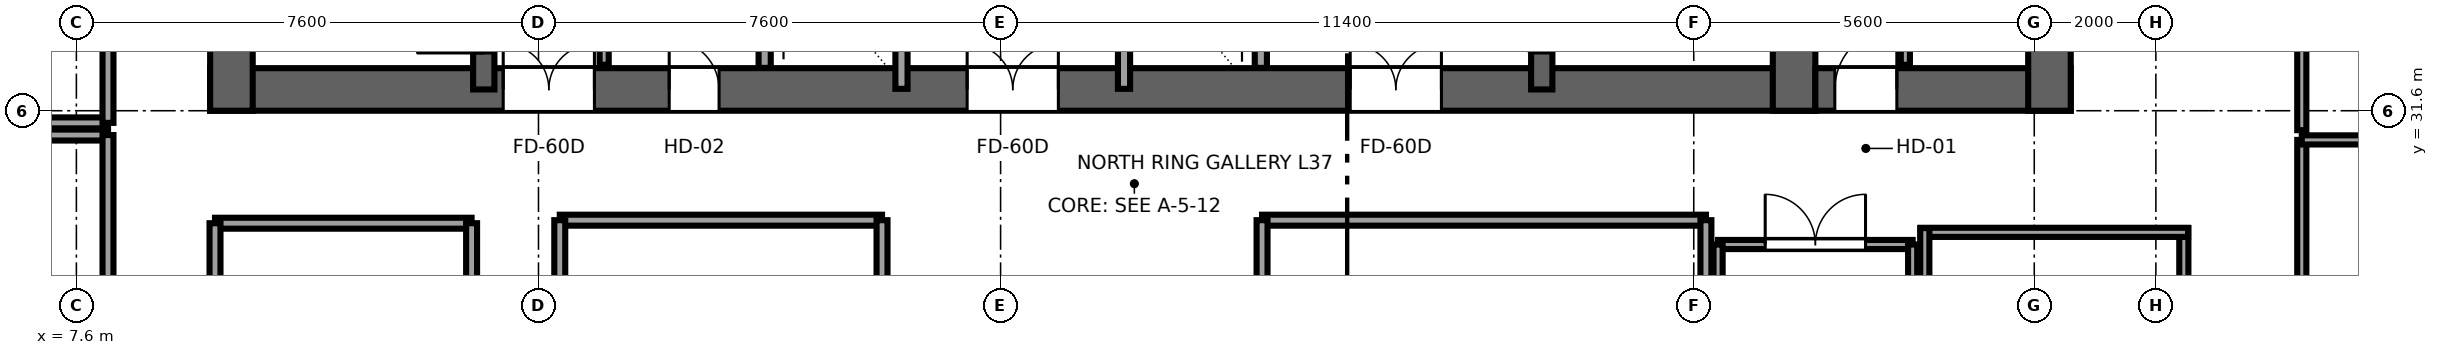
"""IFC4 building model, lengths in metres.
Left out: names, types, materials, properties, quantities, classifications, styles, units other than length and angle.
Written with IfcOpenShell. Run it as: python <this file> out.ifc"""

import sys

from ifc_helpers import new_model, si_unit, direction, frame, frame_2d, origin, place, context, subcontext, project, spatial, rectangle, extrude, source, transform, mapped, element, fill, save


model = new_model("IFC4")
c1 = context("Model", 3, precision=1e-05, world=origin(), true_north=direction((0.0, 1.0)))
c2 = subcontext(c1, "Body", "Model", "MODEL_VIEW")
j1 = project(units=[si_unit("LENGTHUNIT", "METRE"), si_unit("PLANEANGLEUNIT", "RADIAN")], contexts=[c1])
p1 = place(None, origin())
s1 = spatial("IfcSite", under=j1, at=p1, CompositionType="ELEMENT")
p2 = place(p1, origin())
s2 = spatial("IfcBuilding", under=s1, at=p2, CompositionType="ELEMENT")
p3 = place(p2, frame((0.0, 0.0, 143.5)))
s3 = spatial("IfcBuildingStorey", under=s2, at=p3, CompositionType="ELEMENT", Elevation=143.5)
p4 = place(p3, frame((9.8, 31.95, 0.0), z_axis=(0.0, 0.0, 1.0), x_axis=(1.0, 0.0, 0.0)))
e1 = element("IfcWall", 1, at=p4, inside=s3, PredefinedType="SHEAR", context=c2, shape_type="SweptSolid", body=[
    extrude(rectangle(XDim=26.4, YDim=0.7, at=frame_2d((13.2, 0.0))), origin(), (0.0, 0.0, 1.0), 3.55),
])
p5 = place(p4, frame((6.32, 0.0, 0.0), z_axis=(0.0, 0.0, 1.0), x_axis=(-1.0, 0.0, 0.0)))
e2 = element("IfcOpeningElement", 2, at=p5, cuts=e1, PredefinedType="OPENING", context=c2, shape_type="SweptSolid", body=[
    extrude(rectangle(XDim=1.5, YDim=2.04, at=frame_2d((0.75, 1.02))), frame((0.0, 0.36, 0.0), z_axis=(0.0, -1.0, 0.0), x_axis=(1.0, 0.0, 0.0)), (0.0, 0.0, 1.0), 0.72),
])
p6 = place(p4, frame((13.95, 0.0, 0.0), z_axis=(0.0, 0.0, 1.0), x_axis=(-1.0, 0.0, 0.0)))
e3 = element("IfcOpeningElement", 3, at=p6, cuts=e1, PredefinedType="OPENING", context=c2, shape_type="SweptSolid", body=[
    extrude(rectangle(XDim=1.5, YDim=2.04, at=frame_2d((0.75, 1.02))), frame((0.0, 0.36, 0.0), z_axis=(0.0, -1.0, 0.0), x_axis=(1.0, 0.0, 0.0)), (0.0, 0.0, 1.0), 0.72),
])
p7 = place(p4, frame((20.25, 0.0, 0.0), z_axis=(0.0, 0.0, 1.0), x_axis=(-1.0, 0.0, 0.0)))
e4 = element("IfcOpeningElement", 4, at=p7, cuts=e1, PredefinedType="OPENING", context=c2, shape_type="SweptSolid", body=[
    extrude(rectangle(XDim=1.5, YDim=2.04, at=frame_2d((0.75, 1.02))), frame((0.0, 0.36, 0.0), z_axis=(0.0, -1.0, 0.0), x_axis=(1.0, 0.0, 0.0)), (0.0, 0.0, 1.0), 0.72),
])
p8 = place(p4, frame((8.37, 0.0, 0.0), z_axis=(0.0, 0.0, 1.0), x_axis=(-1.0, 0.0, 0.0)))
e5 = element("IfcOpeningElement", 5, at=p8, cuts=e1, PredefinedType="OPENING", context=c2, shape_type="SweptSolid", body=[
    extrude(rectangle(XDim=0.82, YDim=2.01, at=frame_2d((0.41, 1.005))), frame((0.0, 0.36, 0.0), z_axis=(0.0, -1.0, 0.0), x_axis=(1.0, 0.0, 0.0)), (0.0, 0.0, 1.0), 0.72),
])
for number, where, z_axis, x_axis in (
    (6, (10.15, 31.6, 0.0), (0.0, 0.0, 1.0), (0.0, 1.0, 0.0)),
    (7, (35.85, 31.6, 0.0), (0.0, 0.0, 1.0), (0.0, 1.0, 0.0)),
):
    element("IfcWall", number, at=place(p3, frame(where, z_axis=z_axis, x_axis=x_axis)), inside=s3, PredefinedType="SHEAR", context=c2, shape_type="SweptSolid", body=[
        extrude(rectangle(XDim=13.6, YDim=0.7, at=frame_2d((6.8, 0.0))), origin(), (0.0, 0.0, 1.0), 3.55),
    ])
p9 = place(p3, frame((14.3, 31.95, 0.0), z_axis=(0.0, 0.0, 1.0), x_axis=(0.0, 1.0, 0.0)))
e8 = element("IfcWall", 8, at=p9, inside=s3, PredefinedType="SHEAR", context=c2, shape_type="SweptSolid", body=[
    extrude(rectangle(XDim=12.9, YDim=0.35, at=frame_2d((6.45, 0.0))), origin(), (0.0, 0.0, 1.0), 3.55),
])
p10 = place(p9, frame((0.6, 0.0, 0.0)))
e9 = element("IfcOpeningElement", 9, at=p10, cuts=e8, PredefinedType="OPENING", context=c2, shape_type="SweptSolid", body=[
    extrude(rectangle(XDim=1.1, YDim=2.12, at=frame_2d((0.55, 1.06))), frame((0.0, 0.185, 0.0), z_axis=(0.0, -1.0, 0.0), x_axis=(1.0, 0.0, 0.0)), (0.0, 0.0, 1.0), 0.37),
])
p11 = place(p3, frame((31.7, 31.95, 0.0), z_axis=(0.0, 0.0, 1.0), x_axis=(0.0, 1.0, 0.0)))
e10 = element("IfcWall", 10, at=p11, inside=s3, PredefinedType="SHEAR", context=c2, shape_type="SweptSolid", body=[
    extrude(rectangle(XDim=12.9, YDim=0.35, at=frame_2d((6.45, 0.0))), origin(), (0.0, 0.0, 1.0), 3.55),
])
p12 = place(p11, frame((1.7, 0.0, 0.0), z_axis=(0.0, 0.0, 1.0), x_axis=(-1.0, 0.0, 0.0)))
e11 = element("IfcOpeningElement", 11, at=p12, cuts=e10, PredefinedType="OPENING", context=c2, shape_type="SweptSolid", body=[
    extrude(rectangle(XDim=1.1, YDim=2.12, at=frame_2d((0.55, 1.06))), frame((0.0, 0.185, 0.0), z_axis=(0.0, -1.0, 0.0), x_axis=(1.0, 0.0, 0.0)), (0.0, 0.0, 1.0), 0.37),
])
p13 = place(p3, frame((36.2, 31.95, 0.0), z_axis=(0.0, 0.0, 1.0), x_axis=(1.0, 0.0, 0.0)))
e12 = element("IfcWall", 12, at=p13, inside=s3, PredefinedType="SHEAR", context=c2, shape_type="SweptSolid", body=[
    extrude(rectangle(XDim=4.2, YDim=0.7, at=frame_2d((2.1, 0.0))), origin(), (0.0, 0.0, 1.0), 3.55),
])
p14 = place(p13, frame((1.34, 0.0, 0.0), z_axis=(0.0, 0.0, 1.0), x_axis=(-1.0, 0.0, 0.0)))
e13 = element("IfcOpeningElement", 13, at=p14, cuts=e12, PredefinedType="OPENING", context=c2, shape_type="SweptSolid", body=[
    extrude(rectangle(XDim=1.02, YDim=2.03, at=frame_2d((0.51, 1.015))), frame((0.0, 0.36, 0.0), z_axis=(0.0, -1.0, 0.0), x_axis=(1.0, 0.0, 0.0)), (0.0, 0.0, 1.0), 0.72),
])
p15 = place(p3, frame((40.05, 31.6, 0.0), z_axis=(0.0, 0.0, 1.0), x_axis=(0.0, 1.0, 0.0)))
e14 = element("IfcWall", 14, at=p15, inside=s3, PredefinedType="SHEAR", context=c2, shape_type="SweptSolid", body=[
    extrude(rectangle(XDim=13.6, YDim=0.7, at=frame_2d((6.8, 0.0))), origin(), (0.0, 0.0, 1.0), 3.55),
])
for number, where, z_axis, x_axis in (
    (15, (18.92, 32.304, 0.0), (0.0, 0.0, 1.0), (0.0, 1.0, 0.0)),
    (16, (27.08, 32.304, 0.0), (0.0, 0.0, 1.0), (0.0, 1.0, 0.0)),
):
    element("IfcWall", number, at=place(p3, frame(where, z_axis=z_axis, x_axis=x_axis)), inside=s3, PredefinedType="SOLIDWALL", context=c2, shape_type="SweptSolid", body=[
        extrude(rectangle(XDim=3.846, YDim=0.2, at=frame_2d((1.923, 0.0))), origin(), (0.0, 0.0, 1.0), 3.29),
    ])
p16 = place(p3, frame((21.17, 31.96, 0.0), z_axis=(0.0, 0.0, 1.0), x_axis=(0.0, 1.0, 0.0)))
e17 = element("IfcWall", 17, at=p16, inside=s3, PredefinedType="SOLIDWALL", context=c2, shape_type="SweptSolid", body=[
    extrude(rectangle(XDim=12.58, YDim=0.2, at=frame_2d((6.29, 0.0))), origin(), (0.0, 0.0, 1.0), 3.29),
])
p17 = place(p16, frame((5.74, 0.0, 0.0)))
e18 = element("IfcOpeningElement", 18, at=p17, cuts=e17, PredefinedType="OPENING", context=c2, shape_type="SweptSolid", body=[
    extrude(rectangle(XDim=1.1, YDim=2.12, at=frame_2d((0.55, 1.06))), frame((0.0, 0.11, 0.0), z_axis=(0.0, -1.0, 0.0), x_axis=(1.0, 0.0, 0.0)), (0.0, 0.0, 1.0), 0.22),
])
p18 = place(p16, frame((8.24, 0.0, 0.0)))
e19 = element("IfcOpeningElement", 19, at=p18, cuts=e17, PredefinedType="OPENING", context=c2, shape_type="SweptSolid", body=[
    extrude(rectangle(XDim=1.1, YDim=2.12, at=frame_2d((0.55, 1.06))), frame((0.0, 0.11, 0.0), z_axis=(0.0, -1.0, 0.0), x_axis=(1.0, 0.0, 0.0)), (0.0, 0.0, 1.0), 0.22),
])
p19 = place(p3, frame((24.83, 31.96, 0.0), z_axis=(0.0, 0.0, 1.0), x_axis=(0.0, 1.0, 0.0)))
e20 = element("IfcWall", 20, at=p19, inside=s3, PredefinedType="SOLIDWALL", context=c2, shape_type="SweptSolid", body=[
    extrude(rectangle(XDim=12.58, YDim=0.2, at=frame_2d((6.29, 0.0))), origin(), (0.0, 0.0, 1.0), 3.29),
])
p20 = place(p19, frame((5.74, 0.0, 0.0)))
e21 = element("IfcOpeningElement", 21, at=p20, cuts=e20, PredefinedType="OPENING", context=c2, shape_type="SweptSolid", body=[
    extrude(rectangle(XDim=1.1, YDim=2.12, at=frame_2d((0.55, 1.06))), frame((0.0, 0.11, 0.0), z_axis=(0.0, -1.0, 0.0), x_axis=(1.0, 0.0, 0.0)), (0.0, 0.0, 1.0), 0.22),
])
p21 = place(p19, frame((8.24, 0.0, 0.0)))
e22 = element("IfcOpeningElement", 22, at=p21, cuts=e20, PredefinedType="OPENING", context=c2, shape_type="SweptSolid", body=[
    extrude(rectangle(XDim=1.1, YDim=2.12, at=frame_2d((0.55, 1.06))), frame((0.0, 0.11, 0.0), z_axis=(0.0, -1.0, 0.0), x_axis=(1.0, 0.0, 0.0)), (0.0, 0.0, 1.0), 0.22),
])
p22 = place(p3, frame((16.28, 32.355, 0.0), z_axis=(0.0, 0.0, 1.0), x_axis=(0.0, 1.0, 0.0)))
e23 = element("IfcWall", 23, at=p22, inside=s3, PredefinedType="PARTITIONING", context=c2, shape_type="SweptSolid", body=[
    extrude(rectangle(XDim=0.865, YDim=0.15, at=frame_2d((0.433, 0.0))), origin(), (0.0, 0.0, 1.0), 3.29),
])
p23 = place(p3, frame((37.68, 32.355, 0.0), z_axis=(0.0, 0.0, 1.0), x_axis=(0.0, 1.0, 0.0)))
e24 = element("IfcWall", 24, at=p23, inside=s3, PredefinedType="PARTITIONING", context=c2, shape_type="SweptSolid", body=[
    extrude(rectangle(XDim=3.845, YDim=0.15, at=frame_2d((1.922, 0.0))), origin(), (0.0, 0.0, 1.0), 3.29),
])
p24 = place(p23, frame((1.413, 0.0, 0.0)))
e25 = element("IfcOpeningElement", 25, at=p24, cuts=e24, PredefinedType="OPENING", context=c2, shape_type="SweptSolid", body=[
    extrude(rectangle(XDim=1.02, YDim=2.03, at=frame_2d((0.51, 1.015))), frame((0.0, 0.085, 0.0), z_axis=(0.0, -1.0, 0.0), x_axis=(1.0, 0.0, 0.0)), (0.0, 0.0, 1.0), 0.17),
])
p25 = place(p3, frame((0.405, 31.2, 0.0), z_axis=(0.0, 0.0, 1.0), x_axis=(1.0, 0.0, 0.0)))
e26 = element("IfcWall", 26, at=p25, inside=s3, PredefinedType="PARTITIONING", context=c2, shape_type="SweptSolid", body=[
    extrude(rectangle(XDim=7.715, YDim=0.18, at=frame_2d((3.857, 0.0))), origin(), (0.0, 0.0, 1.0), 3.29),
])
p26 = place(p3, frame((8.12, 23.7, 0.0), z_axis=(0.0, 0.0, 1.0), x_axis=(0.0, 1.0, 0.0)))
e27 = element("IfcWall", 27, at=p26, inside=s3, PredefinedType="PARTITIONING", context=c2, shape_type="SweptSolid", body=[
    extrude(rectangle(XDim=7.5, YDim=0.18, at=frame_2d((3.75, 0.0))), origin(), (0.0, 0.0, 1.0), 3.29),
])
p27 = place(p26, frame((2.925, 0.0, 0.0)))
e28 = element("IfcOpeningElement", 28, at=p27, cuts=e27, PredefinedType="OPENING", context=c2, shape_type="SweptSolid", body=[
    extrude(rectangle(XDim=1.65, YDim=2.15, at=frame_2d((0.825, 1.075))), frame((0.0, 0.1, 0.0), z_axis=(0.0, -1.0, 0.0), x_axis=(1.0, 0.0, 0.0)), (0.0, 0.0, 1.0), 0.2),
])
p28 = place(p3, frame((0.405, 31.4, 0.0), z_axis=(0.0, 0.0, 1.0), x_axis=(1.0, 0.0, 0.0)))
e29 = element("IfcWall", 29, at=p28, inside=s3, PredefinedType="PARTITIONING", context=c2, shape_type="SweptSolid", body=[
    extrude(rectangle(XDim=7.715, YDim=0.18, at=frame_2d((3.857, 0.0))), origin(), (0.0, 0.0, 1.0), 3.29),
])
p29 = place(p3, frame((8.12, 31.4, 0.0), z_axis=(0.0, 0.0, 1.0), x_axis=(0.0, 1.0, 0.0)))
e30 = element("IfcWall", 30, at=p29, inside=s3, PredefinedType="PARTITIONING", context=c2, shape_type="SweptSolid", body=[
    extrude(rectangle(XDim=6.8, YDim=0.18, at=frame_2d((3.4, 0.0))), origin(), (0.0, 0.0, 1.0), 3.29),
])
p30 = place(p29, frame((3.175, 0.0, 0.0)))
e31 = element("IfcOpeningElement", 31, at=p30, cuts=e30, PredefinedType="OPENING", context=c2, shape_type="SweptSolid", body=[
    extrude(rectangle(XDim=1.65, YDim=2.15, at=frame_2d((0.825, 1.075))), frame((0.0, 0.1, 0.0), z_axis=(0.0, -1.0, 0.0), x_axis=(1.0, 0.0, 0.0)), (0.0, 0.0, 1.0), 0.2),
])
p31 = place(p3, frame((44.2, 23.78, 0.0), z_axis=(0.0, 0.0, 1.0), x_axis=(0.0, 1.0, 0.0)))
e32 = element("IfcWall", 32, at=p31, inside=s3, PredefinedType="PARTITIONING", context=c2, shape_type="SweptSolid", body=[
    extrude(rectangle(XDim=7.34, YDim=0.15, at=frame_2d((3.67, 0.0))), origin(), (0.0, 0.0, 1.0), 3.29),
])
p32 = place(p31, frame((3.18, 0.0, 0.0)))
e33 = element("IfcOpeningElement", 33, at=p32, cuts=e32, PredefinedType="OPENING", context=c2, shape_type="SweptSolid", body=[
    extrude(rectangle(XDim=0.98, YDim=2.12, at=frame_2d((0.49, 1.06))), frame((0.0, 0.085, 0.0), z_axis=(0.0, -1.0, 0.0), x_axis=(1.0, 0.0, 0.0)), (0.0, 0.0, 1.0), 0.17),
])
p33 = place(p3, frame((44.2, 31.12, 0.0), z_axis=(0.0, 0.0, 1.0), x_axis=(1.0, 0.0, 0.0)))
e34 = element("IfcWall", 34, at=p33, inside=s3, PredefinedType="PARTITIONING", context=c2, shape_type="SweptSolid", body=[
    extrude(rectangle(XDim=10.03, YDim=0.15, at=frame_2d((5.015, 0.0))), origin(), (0.0, 0.0, 1.0), 3.29),
])
p34 = place(p3, frame((44.2, 31.28, 0.0), z_axis=(0.0, 0.0, 1.0), x_axis=(0.0, 1.0, 0.0)))
e35 = element("IfcWall", 35, at=p34, inside=s3, PredefinedType="PARTITIONING", context=c2, shape_type="SweptSolid", body=[
    extrude(rectangle(XDim=6.24, YDim=0.15, at=frame_2d((3.12, 0.0))), origin(), (0.0, 0.0, 1.0), 3.29),
])
p35 = place(p34, frame((3.23, 0.0, 0.0)))
e36 = element("IfcOpeningElement", 36, at=p35, cuts=e35, PredefinedType="OPENING", context=c2, shape_type="SweptSolid", body=[
    extrude(rectangle(XDim=0.98, YDim=2.12, at=frame_2d((0.49, 1.06))), frame((0.0, 0.085, 0.0), z_axis=(0.0, -1.0, 0.0), x_axis=(1.0, 0.0, 0.0)), (0.0, 0.0, 1.0), 0.17),
])
p36 = place(p3, frame((42.26, 25.93, 0.0), z_axis=(0.0, 0.0, 1.0), x_axis=(0.0, 1.0, 0.0)))
e37 = element("IfcWall", 37, at=p36, inside=s3, PredefinedType="PARTITIONING", context=c2, shape_type="SweptSolid", body=[
    extrude(rectangle(XDim=3.74, YDim=0.15, at=frame_2d((1.87, 0.0))), origin(), (0.0, 0.0, 1.0), 3.29),
])
p37 = place(p36, frame((1.19, 0.0, 0.0)))
e38 = element("IfcOpeningElement", 38, at=p37, cuts=e37, PredefinedType="OPENING", context=c2, shape_type="SweptSolid", body=[
    extrude(rectangle(XDim=0.92, YDim=2.01, at=frame_2d((0.46, 1.005))), frame((0.0, 0.085, 0.0), z_axis=(0.0, -1.0, 0.0), x_axis=(1.0, 0.0, 0.0)), (0.0, 0.0, 1.0), 0.17),
])
p38 = place(p3, frame((37.93, 29.6, 0.0), z_axis=(0.0, 0.0, 1.0), x_axis=(1.0, 0.0, 0.0)))
e39 = element("IfcWall", 39, at=p38, inside=s3, PredefinedType="PARTITIONING", context=c2, shape_type="SweptSolid", body=[
    extrude(rectangle(XDim=4.4, YDim=0.15, at=frame_2d((2.2, 0.0))), origin(), (0.0, 0.0, 1.0), 3.29),
])
p39 = place(p3, frame((38.0, 25.93, 0.0), z_axis=(0.0, 0.0, 1.0), x_axis=(0.0, 1.0, 0.0)))
e40 = element("IfcWall", 40, at=p39, inside=s3, PredefinedType="PARTITIONING", context=c2, shape_type="SweptSolid", body=[
    extrude(rectangle(XDim=3.74, YDim=0.15, at=frame_2d((1.87, 0.0))), origin(), (0.0, 0.0, 1.0), 3.29),
])
p40 = place(p3, frame((9.88, 29.75, 0.0), z_axis=(0.0, 0.0, 1.0), x_axis=(1.0, 0.0, 0.0)))
e41 = element("IfcWall", 41, at=p40, inside=s3, PredefinedType="PARTITIONING", context=c2, shape_type="SweptSolid", body=[
    extrude(rectangle(XDim=4.22, YDim=0.18, at=frame_2d((2.11, 0.0))), origin(), (0.0, 0.0, 1.0), 3.29),
])
for number, where, z_axis, x_axis in (
    (42, (9.88, 23.7, 0.0), (0.0, 0.0, 1.0), (0.0, 1.0, 0.0)),
    (43, (14.1, 23.7, 0.0), (0.0, 0.0, 1.0), (0.0, 1.0, 0.0)),
):
    element("IfcWall", number, at=place(p3, frame(where, z_axis=z_axis, x_axis=x_axis)), inside=s3, PredefinedType="PARTITIONING", context=c2, shape_type="SweptSolid", body=[
        extrude(rectangle(XDim=6.05, YDim=0.18, at=frame_2d((3.025, 0.0))), origin(), (0.0, 0.0, 1.0), 3.29),
    ])
p41 = place(p3, frame((27.1, 29.8, 0.0), z_axis=(0.0, 0.0, 1.0), x_axis=(1.0, 0.0, 0.0)))
e44 = element("IfcWall", 44, at=p41, inside=s3, PredefinedType="PARTITIONING", context=c2, shape_type="SweptSolid", body=[
    extrude(rectangle(XDim=7.3, YDim=0.18, at=frame_2d((3.65, 0.0))), origin(), (0.0, 0.0, 1.0), 3.29),
])
for number, where, z_axis, x_axis in (
    (45, (27.1, 23.7, 0.0), (0.0, 0.0, 1.0), (0.0, 1.0, 0.0)),
    (46, (34.4, 23.7, 0.0), (0.0, 0.0, 1.0), (0.0, 1.0, 0.0)),
):
    element("IfcWall", number, at=place(p3, frame(where, z_axis=z_axis, x_axis=x_axis)), inside=s3, PredefinedType="PARTITIONING", context=c2, shape_type="SweptSolid", body=[
        extrude(rectangle(XDim=6.1, YDim=0.18, at=frame_2d((3.05, 0.0))), origin(), (0.0, 0.0, 1.0), 3.29),
    ])
p42 = place(p3, frame((15.55, 29.8, 0.0), z_axis=(0.0, 0.0, 1.0), x_axis=(1.0, 0.0, 0.0)))
e47 = element("IfcWall", 47, at=p42, inside=s3, PredefinedType="PARTITIONING", context=c2, shape_type="SweptSolid", body=[
    extrude(rectangle(XDim=5.3, YDim=0.18, at=frame_2d((2.65, 0.0))), origin(), (0.0, 0.0, 1.0), 3.29),
])
for number, where, z_axis, x_axis in (
    (48, (15.55, 23.7, 0.0), (0.0, 0.0, 1.0), (0.0, 1.0, 0.0)),
    (49, (20.85, 23.7, 0.0), (0.0, 0.0, 1.0), (0.0, 1.0, 0.0)),
):
    element("IfcWall", number, at=place(p3, frame(where, z_axis=z_axis, x_axis=x_axis)), inside=s3, PredefinedType="PARTITIONING", context=c2, shape_type="SweptSolid", body=[
        extrude(rectangle(XDim=6.1, YDim=0.18, at=frame_2d((3.05, 0.0))), origin(), (0.0, 0.0, 1.0), 3.29),
    ])
p43 = place(p3, frame((34.6, 29.4, 0.0), z_axis=(0.0, 0.0, 1.0), x_axis=(1.0, 0.0, 0.0)))
e50 = element("IfcWall", 50, at=p43, inside=s3, PredefinedType="PARTITIONING", context=c2, shape_type="SweptSolid", body=[
    extrude(rectangle(XDim=3.2, YDim=0.15, at=frame_2d((1.6, 0.0))), origin(), (0.0, 0.0, 1.0), 3.29),
])
p44 = place(p43, frame((0.775, 0.0, 0.0)))
e51 = element("IfcOpeningElement", 51, at=p44, cuts=e50, PredefinedType="OPENING", context=c2, shape_type="SweptSolid", body=[
    extrude(rectangle(XDim=1.65, YDim=2.15, at=frame_2d((0.825, 1.075))), frame((0.0, 0.085, 0.0), z_axis=(0.0, -1.0, 0.0), x_axis=(1.0, 0.0, 0.0)), (0.0, 0.0, 1.0), 0.17),
])
for number, where, z_axis, x_axis in (
    (52, (34.6, 23.7, 0.0), (0.0, 0.0, 1.0), (0.0, 1.0, 0.0)),
    (53, (37.8, 23.7, 0.0), (0.0, 0.0, 1.0), (0.0, 1.0, 0.0)),
):
    element("IfcWall", number, at=place(p3, frame(where, z_axis=z_axis, x_axis=x_axis)), inside=s3, PredefinedType="PARTITIONING", context=c2, shape_type="SweptSolid", body=[
        extrude(rectangle(XDim=5.7, YDim=0.15, at=frame_2d((2.85, 0.0))), origin(), (0.0, 0.0, 1.0), 3.29),
    ])
m1 = source(origin(), c2, "Body", "SweptSolid", [
    extrude(rectangle(XDim=1.1, YDim=2.12, at=frame_2d((0.55, 1.06))), frame((0.0, 0.025, 0.0), z_axis=(0.0, -1.0, 0.0), x_axis=(1.0, 0.0, 0.0)), (0.0, 0.0, 1.0), 0.05),
])
p45 = place(p10, origin())
e54 = element("IfcDoor", 54, at=p45, inside=s3, OperationType="SINGLE_SWING_LEFT", PredefinedType="DOOR", context=c2, shape_type="MappedRepresentation", body=[
    mapped(m1, transform((0.0, 0.0, 0.0), x_axis=(1.0, 0.0, 0.0), y_axis=(0.0, 1.0, 0.0), z_axis=(0.0, 0.0, 1.0), scale=1.0)),
])
fill(e9, e54)
p46 = place(p12, origin())
e55 = element("IfcDoor", 55, at=p46, inside=s3, OperationType="SINGLE_SWING_RIGHT", PredefinedType="DOOR", context=c2, shape_type="MappedRepresentation", body=[
    mapped(m1, transform((0.0, 0.0, 0.0), x_axis=(1.0, 0.0, 0.0), y_axis=(0.0, 1.0, 0.0), z_axis=(0.0, 0.0, 1.0), scale=1.0)),
])
fill(e11, e55)
m2 = source(origin(), c2, "Body", "SweptSolid", [
    extrude(rectangle(XDim=1.5, YDim=2.04, at=frame_2d((0.75, 1.02))), frame((0.0, 0.025, 0.0), z_axis=(0.0, -1.0, 0.0), x_axis=(1.0, 0.0, 0.0)), (0.0, 0.0, 1.0), 0.05),
])
p47 = place(p5, origin())
e56 = element("IfcDoor", 56, at=p47, inside=s3, OperationType="DOUBLE_DOOR_SINGLE_SWING", PredefinedType="DOOR", context=c2, shape_type="MappedRepresentation", body=[
    mapped(m2, transform((0.0, 0.0, 0.0), x_axis=(1.0, 0.0, 0.0), y_axis=(0.0, 1.0, 0.0), z_axis=(0.0, 0.0, 1.0), scale=1.0)),
])
fill(e2, e56)
p48 = place(p6, origin())
e57 = element("IfcDoor", 57, at=p48, inside=s3, OperationType="DOUBLE_DOOR_SINGLE_SWING", PredefinedType="DOOR", context=c2, shape_type="MappedRepresentation", body=[
    mapped(m2, transform((0.0, 0.0, 0.0), x_axis=(1.0, 0.0, 0.0), y_axis=(0.0, 1.0, 0.0), z_axis=(0.0, 0.0, 1.0), scale=1.0)),
])
fill(e3, e57)
p49 = place(p7, origin())
e58 = element("IfcDoor", 58, at=p49, inside=s3, OperationType="DOUBLE_DOOR_SINGLE_SWING", PredefinedType="DOOR", context=c2, shape_type="MappedRepresentation", body=[
    mapped(m2, transform((0.0, 0.0, 0.0), x_axis=(1.0, 0.0, 0.0), y_axis=(0.0, 1.0, 0.0), z_axis=(0.0, 0.0, 1.0), scale=1.0)),
])
fill(e4, e58)
m3 = source(origin(), c2, "Body", "SweptSolid", [
    extrude(rectangle(XDim=0.82, YDim=2.01, at=frame_2d((0.41, 1.005))), frame((0.0, 0.025, 0.0), z_axis=(0.0, -1.0, 0.0), x_axis=(1.0, 0.0, 0.0)), (0.0, 0.0, 1.0), 0.05),
])
p50 = place(p8, origin())
e59 = element("IfcDoor", 59, at=p50, inside=s3, OperationType="SINGLE_SWING_LEFT", PredefinedType="DOOR", context=c2, shape_type="MappedRepresentation", body=[
    mapped(m3, transform((0.0, 0.0, 0.0), x_axis=(1.0, 0.0, 0.0), y_axis=(0.0, 1.0, 0.0), z_axis=(0.0, 0.0, 1.0), scale=1.0)),
])
fill(e5, e59)
m4 = source(origin(), c2, "Body", "SweptSolid", [
    extrude(rectangle(XDim=1.02, YDim=2.03, at=frame_2d((0.51, 1.015))), frame((0.0, 0.025, 0.0), z_axis=(0.0, -1.0, 0.0), x_axis=(1.0, 0.0, 0.0)), (0.0, 0.0, 1.0), 0.05),
])
p51 = place(p14, origin())
e60 = element("IfcDoor", 60, at=p51, inside=s3, OperationType="SINGLE_SWING_RIGHT", PredefinedType="DOOR", context=c2, shape_type="MappedRepresentation", body=[
    mapped(m4, transform((0.0, 0.0, 0.0), x_axis=(1.0, 0.0, 0.0), y_axis=(0.0, 1.0, 0.0), z_axis=(0.0, 0.0, 1.0), scale=1.0)),
])
fill(e13, e60)
m5 = source(origin(), c2, "Body", "SweptSolid", [
    extrude(rectangle(XDim=1.65, YDim=2.15, at=frame_2d((0.825, 1.075))), frame((0.0, 0.025, 0.0), z_axis=(0.0, -1.0, 0.0), x_axis=(1.0, 0.0, 0.0)), (0.0, 0.0, 1.0), 0.05),
])
p52 = place(p44, origin())
e61 = element("IfcDoor", 61, at=p52, inside=s3, OperationType="DOUBLE_DOOR_SINGLE_SWING", PredefinedType="DOOR", context=c2, shape_type="MappedRepresentation", body=[
    mapped(m5, transform((0.0, 0.0, 0.0), x_axis=(1.0, 0.0, 0.0), y_axis=(0.0, 1.0, 0.0), z_axis=(0.0, 0.0, 1.0), scale=1.0)),
])
fill(e51, e61)
save(model, sys.argv[1])
